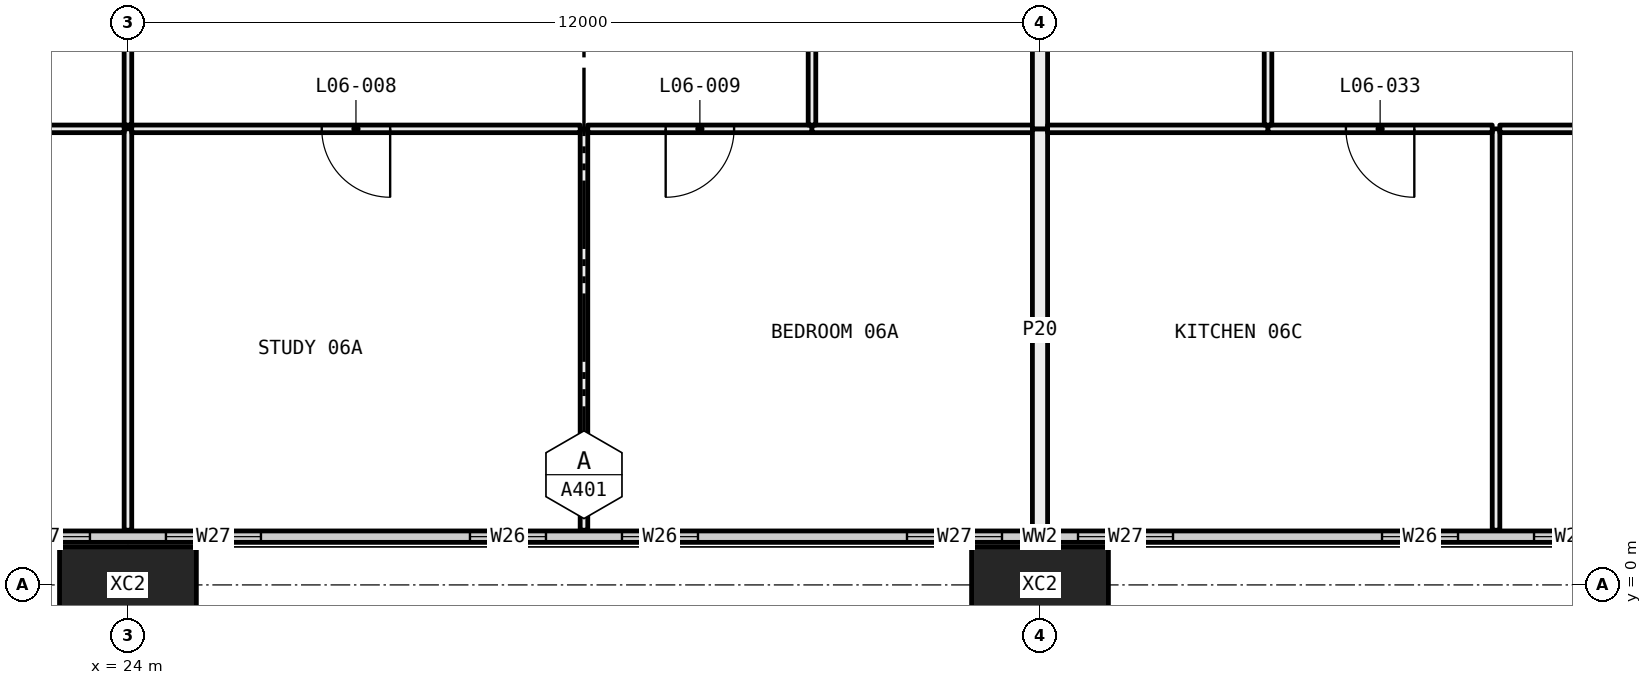
"""IFC4 building model, lengths in metres.
Left out: names, types, materials, properties, quantities, classifications, styles, units other than length and angle.
Written with IfcOpenShell. Run it as: python <this file> out.ifc"""

import sys

from ifc_helpers import new_model, si_unit, direction, frame, frame_2d, origin, origin_2d, place, context, subcontext, project, spatial, rectangle, hollow_rectangle, extrude, element, fill, save


model = new_model("IFC4")
c1 = context("Model", 3, precision=1e-05, world=origin(), true_north=direction((0.0, 1.0)))
c2 = subcontext(c1, "Body", "Model", "MODEL_VIEW")
j1 = project(units=[si_unit("LENGTHUNIT", "METRE"), si_unit("PLANEANGLEUNIT", "RADIAN")], contexts=[c1])
p1 = place(None, origin())
s1 = spatial("IfcSite", under=j1, at=p1, CompositionType="ELEMENT")
p2 = place(p1, origin())
s2 = spatial("IfcBuilding", under=s1, at=p2, CompositionType="ELEMENT")
p3 = place(p2, frame((0.0, 0.0, 33.45)))
s3 = spatial("IfcBuildingStorey", under=s2, at=p3, CompositionType="ELEMENT", Elevation=33.45)
for number, where, z_axis, x_axis in (
    (1, (24.0, 0.0, -0.4), (0.0, 0.0, 1.0), (1.0, 0.0, 0.0)),
    (2, (36.0, 0.0, -0.4), (0.0, 0.0, 1.0), (1.0, 0.0, 0.0)),
):
    element("IfcColumn", number, at=place(p3, frame(where, z_axis=z_axis, x_axis=x_axis)), inside=s3, PredefinedType="COLUMN", context=c2, shape_type="SweptSolid", body=[
        extrude(hollow_rectangle(XDim=1.8, YDim=1.0, WallThickness=0.07, at=origin_2d()), origin(), (0.0, 0.0, 1.0), 3.45),
    ])
p4 = place(p3, frame((6.56, 0.635, 0.0), z_axis=(0.0, 0.0, 1.0), x_axis=(1.0, 0.0, 0.0)))
e3 = element("IfcWall", 3, at=p4, inside=s3, PredefinedType="ELEMENTEDWALL", context=c2, shape_type="SweptSolid", body=[
    extrude(rectangle(XDim=58.88, YDim=0.15, at=frame_2d((29.44, 0.0))), origin(), (0.0, 0.0, 1.0), 3.05),
])
p5 = place(p4, frame((0.44, 0.0, 0.45)))
e4 = element("IfcOpeningElement", 4, at=p5, cuts=e3, PredefinedType="OPENING", context=c2, shape_type="SweptSolid", body=[
    extrude(rectangle(XDim=4.5, YDim=2.55, at=frame_2d((2.25, 1.275))), frame((0.0, 0.085, 0.0), z_axis=(0.0, -1.0, 0.0), x_axis=(1.0, 0.0, 0.0)), (0.0, 0.0, 1.0), 0.17),
])
p6 = place(p4, frame((5.94, 0.0, 0.45)))
e5 = element("IfcOpeningElement", 5, at=p6, cuts=e3, PredefinedType="OPENING", context=c2, shape_type="SweptSolid", body=[
    extrude(rectangle(XDim=1.25, YDim=2.55, at=frame_2d((0.625, 1.275))), frame((0.0, 0.085, 0.0), z_axis=(0.0, -1.0, 0.0), x_axis=(1.0, 0.0, 0.0)), (0.0, 0.0, 1.0), 0.17),
])
p7 = place(p4, frame((9.94, 0.0, 0.45)))
e6 = element("IfcOpeningElement", 6, at=p7, cuts=e3, PredefinedType="OPENING", context=c2, shape_type="SweptSolid", body=[
    extrude(rectangle(XDim=1.0, YDim=2.55, at=frame_2d((0.5, 1.275))), frame((0.0, 0.085, 0.0), z_axis=(0.0, -1.0, 0.0), x_axis=(1.0, 0.0, 0.0)), (0.0, 0.0, 1.0), 0.17),
])
p8 = place(p4, frame((11.94, 0.0, 0.45)))
e7 = element("IfcOpeningElement", 7, at=p8, cuts=e3, PredefinedType="OPENING", context=c2, shape_type="SweptSolid", body=[
    extrude(rectangle(XDim=1.0, YDim=2.55, at=frame_2d((0.5, 1.275))), frame((0.0, 0.085, 0.0), z_axis=(0.0, -1.0, 0.0), x_axis=(1.0, 0.0, 0.0)), (0.0, 0.0, 1.0), 0.17),
])
p9 = place(p4, frame((15.69, 0.0, 0.45)))
e8 = element("IfcOpeningElement", 8, at=p9, cuts=e3, PredefinedType="OPENING", context=c2, shape_type="SweptSolid", body=[
    extrude(rectangle(XDim=1.25, YDim=2.55, at=frame_2d((0.625, 1.275))), frame((0.0, 0.085, 0.0), z_axis=(0.0, -1.0, 0.0), x_axis=(1.0, 0.0, 0.0)), (0.0, 0.0, 1.0), 0.17),
])
p10 = place(p4, frame((17.94, 0.0, 0.45)))
e9 = element("IfcOpeningElement", 9, at=p10, cuts=e3, PredefinedType="OPENING", context=c2, shape_type="SweptSolid", body=[
    extrude(rectangle(XDim=1.25, YDim=2.55, at=frame_2d((0.625, 1.275))), frame((0.0, 0.085, 0.0), z_axis=(0.0, -1.0, 0.0), x_axis=(1.0, 0.0, 0.0)), (0.0, 0.0, 1.0), 0.17),
])
p11 = place(p4, frame((21.94, 0.0, 0.45)))
e10 = element("IfcOpeningElement", 10, at=p11, cuts=e3, PredefinedType="OPENING", context=c2, shape_type="SweptSolid", body=[
    extrude(rectangle(XDim=1.0, YDim=2.55, at=frame_2d((0.5, 1.275))), frame((0.0, 0.085, 0.0), z_axis=(0.0, -1.0, 0.0), x_axis=(1.0, 0.0, 0.0)), (0.0, 0.0, 1.0), 0.17),
])
p12 = place(p4, frame((23.94, 0.0, 0.45)))
e11 = element("IfcOpeningElement", 11, at=p12, cuts=e3, PredefinedType="OPENING", context=c2, shape_type="SweptSolid", body=[
    extrude(rectangle(XDim=1.0, YDim=2.55, at=frame_2d((0.5, 1.275))), frame((0.0, 0.085, 0.0), z_axis=(0.0, -1.0, 0.0), x_axis=(1.0, 0.0, 0.0)), (0.0, 0.0, 1.0), 0.17),
])
p13 = place(p4, frame((27.69, 0.0, 0.45)))
e12 = element("IfcOpeningElement", 12, at=p13, cuts=e3, PredefinedType="OPENING", context=c2, shape_type="SweptSolid", body=[
    extrude(rectangle(XDim=1.25, YDim=2.55, at=frame_2d((0.625, 1.275))), frame((0.0, 0.085, 0.0), z_axis=(0.0, -1.0, 0.0), x_axis=(1.0, 0.0, 0.0)), (0.0, 0.0, 1.0), 0.17),
])
p14 = place(p4, frame((29.94, 0.0, 0.45)))
e13 = element("IfcOpeningElement", 13, at=p14, cuts=e3, PredefinedType="OPENING", context=c2, shape_type="SweptSolid", body=[
    extrude(rectangle(XDim=1.25, YDim=2.55, at=frame_2d((0.625, 1.275))), frame((0.0, 0.085, 0.0), z_axis=(0.0, -1.0, 0.0), x_axis=(1.0, 0.0, 0.0)), (0.0, 0.0, 1.0), 0.17),
])
p15 = place(p4, frame((33.94, 0.0, 0.45)))
e14 = element("IfcOpeningElement", 14, at=p15, cuts=e3, PredefinedType="OPENING", context=c2, shape_type="SweptSolid", body=[
    extrude(rectangle(XDim=1.0, YDim=2.55, at=frame_2d((0.5, 1.275))), frame((0.0, 0.085, 0.0), z_axis=(0.0, -1.0, 0.0), x_axis=(1.0, 0.0, 0.0)), (0.0, 0.0, 1.0), 0.17),
])
p16 = place(p4, frame((35.94, 0.0, 0.45)))
e15 = element("IfcOpeningElement", 15, at=p16, cuts=e3, PredefinedType="OPENING", context=c2, shape_type="SweptSolid", body=[
    extrude(rectangle(XDim=1.0, YDim=2.55, at=frame_2d((0.5, 1.275))), frame((0.0, 0.085, 0.0), z_axis=(0.0, -1.0, 0.0), x_axis=(1.0, 0.0, 0.0)), (0.0, 0.0, 1.0), 0.17),
])
p17 = place(p4, frame((39.69, 0.0, 0.45)))
e16 = element("IfcOpeningElement", 16, at=p17, cuts=e3, PredefinedType="OPENING", context=c2, shape_type="SweptSolid", body=[
    extrude(rectangle(XDim=1.25, YDim=2.55, at=frame_2d((0.625, 1.275))), frame((0.0, 0.085, 0.0), z_axis=(0.0, -1.0, 0.0), x_axis=(1.0, 0.0, 0.0)), (0.0, 0.0, 1.0), 0.17),
])
p18 = place(p4, frame((41.94, 0.0, 0.45)))
e17 = element("IfcOpeningElement", 17, at=p18, cuts=e3, PredefinedType="OPENING", context=c2, shape_type="SweptSolid", body=[
    extrude(rectangle(XDim=1.25, YDim=2.55, at=frame_2d((0.625, 1.275))), frame((0.0, 0.085, 0.0), z_axis=(0.0, -1.0, 0.0), x_axis=(1.0, 0.0, 0.0)), (0.0, 0.0, 1.0), 0.17),
])
p19 = place(p4, frame((45.94, 0.0, 0.45)))
e18 = element("IfcOpeningElement", 18, at=p19, cuts=e3, PredefinedType="OPENING", context=c2, shape_type="SweptSolid", body=[
    extrude(rectangle(XDim=1.0, YDim=2.55, at=frame_2d((0.5, 1.275))), frame((0.0, 0.085, 0.0), z_axis=(0.0, -1.0, 0.0), x_axis=(1.0, 0.0, 0.0)), (0.0, 0.0, 1.0), 0.17),
])
p20 = place(p4, frame((47.94, 0.0, 0.45)))
e19 = element("IfcOpeningElement", 19, at=p20, cuts=e3, PredefinedType="OPENING", context=c2, shape_type="SweptSolid", body=[
    extrude(rectangle(XDim=1.0, YDim=2.55, at=frame_2d((0.5, 1.275))), frame((0.0, 0.085, 0.0), z_axis=(0.0, -1.0, 0.0), x_axis=(1.0, 0.0, 0.0)), (0.0, 0.0, 1.0), 0.17),
])
p21 = place(p4, frame((51.69, 0.0, 0.45)))
e20 = element("IfcOpeningElement", 20, at=p21, cuts=e3, PredefinedType="OPENING", context=c2, shape_type="SweptSolid", body=[
    extrude(rectangle(XDim=1.25, YDim=2.55, at=frame_2d((0.625, 1.275))), frame((0.0, 0.085, 0.0), z_axis=(0.0, -1.0, 0.0), x_axis=(1.0, 0.0, 0.0)), (0.0, 0.0, 1.0), 0.17),
])
p22 = place(p4, frame((53.94, 0.0, 0.45)))
e21 = element("IfcOpeningElement", 21, at=p22, cuts=e3, PredefinedType="OPENING", context=c2, shape_type="SweptSolid", body=[
    extrude(rectangle(XDim=4.5, YDim=2.55, at=frame_2d((2.25, 1.275))), frame((0.0, 0.085, 0.0), z_axis=(0.0, -1.0, 0.0), x_axis=(1.0, 0.0, 0.0)), (0.0, 0.0, 1.0), 0.17),
])
p23 = place(p3, frame((24.0, 0.72, 0.0), z_axis=(0.0, 0.0, 1.0), x_axis=(0.0, 1.0, 0.0)))
e22 = element("IfcWall", 22, at=p23, inside=s3, PredefinedType="PARTITIONING", context=c2, shape_type="SweptSolid", body=[
    extrude(rectangle(XDim=5.28, YDim=0.1, at=frame_2d((2.64, 0.0))), origin(), (0.0, 0.0, 1.0), 2.45),
])
p24 = place(p3, frame((23.95, 6.0, 0.0), z_axis=(0.0, 0.0, 1.0), x_axis=(-1.0, 0.0, 0.0)))
e23 = element("IfcWall", 23, at=p24, inside=s3, PredefinedType="PARTITIONING", context=c2, shape_type="SweptSolid", body=[
    extrude(rectangle(XDim=5.9, YDim=0.1, at=frame_2d((2.95, 0.0))), origin(), (0.0, 0.0, 1.0), 2.45),
])
p25 = place(p24, frame((2.5, 0.0, 0.0)))
e24 = element("IfcOpeningElement", 24, at=p25, cuts=e23, PredefinedType="OPENING", context=c2, shape_type="SweptSolid", body=[
    extrude(rectangle(XDim=0.9, YDim=2.1, at=frame_2d((0.45, 1.05))), frame((0.0, 0.06, 0.0), z_axis=(0.0, -1.0, 0.0), x_axis=(1.0, 0.0, 0.0)), (0.0, 0.0, 1.0), 0.12),
])
p26 = place(p3, frame((30.0, 0.72, 0.0), z_axis=(0.0, 0.0, 1.0), x_axis=(0.0, 1.0, 0.0)))
e25 = element("IfcWall", 25, at=p26, inside=s3, PredefinedType="PARTITIONING", context=c2, shape_type="SweptSolid", body=[
    extrude(rectangle(XDim=5.28, YDim=0.1, at=frame_2d((2.64, 0.0))), origin(), (0.0, 0.0, 1.0), 3.05),
])
p27 = place(p3, frame((29.95, 6.0, 0.0), z_axis=(0.0, 0.0, 1.0), x_axis=(-1.0, 0.0, 0.0)))
e26 = element("IfcWall", 26, at=p27, inside=s3, PredefinedType="PARTITIONING", context=c2, shape_type="SweptSolid", body=[
    extrude(rectangle(XDim=5.9, YDim=0.1, at=frame_2d((2.95, 0.0))), origin(), (0.0, 0.0, 1.0), 2.45),
])
p28 = place(p27, frame((2.5, 0.0, 0.0)))
e27 = element("IfcOpeningElement", 27, at=p28, cuts=e26, PredefinedType="OPENING", context=c2, shape_type="SweptSolid", body=[
    extrude(rectangle(XDim=0.9, YDim=2.1, at=frame_2d((0.45, 1.05))), frame((0.0, 0.06, 0.0), z_axis=(0.0, -1.0, 0.0), x_axis=(1.0, 0.0, 0.0)), (0.0, 0.0, 1.0), 0.12),
])
p29 = place(p3, frame((33.0, 6.0, 0.0), z_axis=(0.0, 0.0, 1.0), x_axis=(-1.0, 0.0, 0.0)))
e28 = element("IfcWall", 28, at=p29, inside=s3, PredefinedType="PARTITIONING", context=c2, shape_type="SweptSolid", body=[
    extrude(rectangle(XDim=2.95, YDim=0.1, at=frame_2d((1.475, 0.0))), origin(), (0.0, 0.0, 1.0), 3.05),
])
p30 = place(p29, frame((1.025, 0.0, 0.0)))
e29 = element("IfcOpeningElement", 29, at=p30, cuts=e28, PredefinedType="OPENING", context=c2, shape_type="SweptSolid", body=[
    extrude(rectangle(XDim=0.9, YDim=2.1, at=frame_2d((0.45, 1.05))), frame((0.0, 0.06, 0.0), z_axis=(0.0, -1.0, 0.0), x_axis=(1.0, 0.0, 0.0)), (0.0, 0.0, 1.0), 0.12),
])
p31 = place(p3, frame((35.9, 6.0, 0.0), z_axis=(0.0, 0.0, 1.0), x_axis=(-1.0, 0.0, 0.0)))
e30 = element("IfcWall", 30, at=p31, inside=s3, PredefinedType="PARTITIONING", context=c2, shape_type="SweptSolid", body=[
    extrude(rectangle(XDim=2.9, YDim=0.1, at=frame_2d((1.45, 0.0))), origin(), (0.0, 0.0, 1.0), 3.05),
])
p32 = place(p3, frame((36.0, 0.72, 0.0), z_axis=(0.0, 0.0, 1.0), x_axis=(0.0, 1.0, 0.0)))
e31 = element("IfcWall", 31, at=p32, inside=s3, PredefinedType="PARTITIONING", context=c2, shape_type="SweptSolid", body=[
    extrude(rectangle(XDim=5.28, YDim=0.2, at=frame_2d((2.64, 0.0))), origin(), (0.0, 0.0, 1.0), 2.45),
])
p33 = place(p3, frame((24.0, 6.05, 0.0), z_axis=(0.0, 0.0, 1.0), x_axis=(0.0, 1.0, 0.0)))
e32 = element("IfcWall", 32, at=p33, inside=s3, PredefinedType="PARTITIONING", context=c2, shape_type="SweptSolid", body=[
    extrude(rectangle(XDim=5.15, YDim=0.1, at=frame_2d((2.575, 0.0))), origin(), (0.0, 0.0, 1.0), 2.45),
])
p34 = place(p33, frame((2.125, 0.0, 0.0)))
e33 = element("IfcOpeningElement", 33, at=p34, cuts=e32, PredefinedType="OPENING", context=c2, shape_type="SweptSolid", body=[
    extrude(rectangle(XDim=0.9, YDim=2.1, at=frame_2d((0.45, 1.05))), frame((0.0, 0.06, 0.0), z_axis=(0.0, -1.0, 0.0), x_axis=(1.0, 0.0, 0.0)), (0.0, 0.0, 1.0), 0.12),
])
p35 = place(p3, frame((33.0, 6.05, 0.0), z_axis=(0.0, 0.0, 1.0), x_axis=(0.0, 1.0, 0.0)))
e34 = element("IfcWall", 34, at=p35, inside=s3, PredefinedType="PARTITIONING", context=c2, shape_type="SweptSolid", body=[
    extrude(rectangle(XDim=5.95, YDim=0.1, at=frame_2d((2.975, 0.0))), origin(), (0.0, 0.0, 1.0), 2.45),
])
p36 = place(p35, frame((2.525, 0.0, 0.0)))
e35 = element("IfcOpeningElement", 35, at=p36, cuts=e34, PredefinedType="OPENING", context=c2, shape_type="SweptSolid", body=[
    extrude(rectangle(XDim=0.9, YDim=2.1, at=frame_2d((0.45, 1.05))), frame((0.0, 0.06, 0.0), z_axis=(0.0, -1.0, 0.0), x_axis=(1.0, 0.0, 0.0)), (0.0, 0.0, 1.0), 0.12),
])
p37 = place(p3, frame((36.0, 6.0, 0.0), z_axis=(0.0, 0.0, 1.0), x_axis=(0.0, 1.0, 0.0)))
e36 = element("IfcWall", 36, at=p37, inside=s3, PredefinedType="PARTITIONING", context=c2, shape_type="SweptSolid", body=[
    extrude(rectangle(XDim=5.2, YDim=0.2, at=frame_2d((2.6, 0.0))), origin(), (0.0, 0.0, 1.0), 2.45),
])
p38 = place(p3, frame((42.0, 0.72, 0.0), z_axis=(0.0, 0.0, 1.0), x_axis=(0.0, 1.0, 0.0)))
e37 = element("IfcWall", 37, at=p38, inside=s3, PredefinedType="PARTITIONING", context=c2, shape_type="SweptSolid", body=[
    extrude(rectangle(XDim=5.28, YDim=0.1, at=frame_2d((2.64, 0.0))), origin(), (0.0, 0.0, 1.0), 3.05),
])
p39 = place(p3, frame((39.0, 6.0, 0.0), z_axis=(0.0, 0.0, 1.0), x_axis=(-1.0, 0.0, 0.0)))
e38 = element("IfcWall", 38, at=p39, inside=s3, PredefinedType="PARTITIONING", context=c2, shape_type="SweptSolid", body=[
    extrude(rectangle(XDim=2.9, YDim=0.1, at=frame_2d((1.45, 0.0))), origin(), (0.0, 0.0, 1.0), 3.05),
])
p40 = place(p3, frame((41.95, 6.0, 0.0), z_axis=(0.0, 0.0, 1.0), x_axis=(-1.0, 0.0, 0.0)))
e39 = element("IfcWall", 39, at=p40, inside=s3, PredefinedType="PARTITIONING", context=c2, shape_type="SweptSolid", body=[
    extrude(rectangle(XDim=2.95, YDim=0.1, at=frame_2d((1.475, 0.0))), origin(), (0.0, 0.0, 1.0), 3.05),
])
p41 = place(p40, frame((1.025, 0.0, 0.0)))
e40 = element("IfcOpeningElement", 40, at=p41, cuts=e39, PredefinedType="OPENING", context=c2, shape_type="SweptSolid", body=[
    extrude(rectangle(XDim=0.9, YDim=2.1, at=frame_2d((0.45, 1.05))), frame((0.0, 0.06, 0.0), z_axis=(0.0, -1.0, 0.0), x_axis=(1.0, 0.0, 0.0)), (0.0, 0.0, 1.0), 0.12),
])
p42 = place(p3, frame((47.07, 6.0, 0.0), z_axis=(0.0, 0.0, 1.0), x_axis=(-1.0, 0.0, 0.0)))
e41 = element("IfcWall", 41, at=p42, inside=s3, PredefinedType="PARTITIONING", context=c2, shape_type="SweptSolid", body=[
    extrude(rectangle(XDim=5.02, YDim=0.1, at=frame_2d((2.51, 0.0))), origin(), (0.0, 0.0, 1.0), 3.05),
])
p43 = place(p3, frame((39.0, 6.05, 0.0), z_axis=(0.0, 0.0, 1.0), x_axis=(0.0, 1.0, 0.0)))
e42 = element("IfcWall", 42, at=p43, inside=s3, PredefinedType="PARTITIONING", context=c2, shape_type="SweptSolid", body=[
    extrude(rectangle(XDim=5.95, YDim=0.1, at=frame_2d((2.975, 0.0))), origin(), (0.0, 0.0, 1.0), 2.45),
])
p44 = place(p43, frame((2.525, 0.0, 0.0)))
e43 = element("IfcOpeningElement", 43, at=p44, cuts=e42, PredefinedType="OPENING", context=c2, shape_type="SweptSolid", body=[
    extrude(rectangle(XDim=0.9, YDim=2.1, at=frame_2d((0.45, 1.05))), frame((0.0, 0.06, 0.0), z_axis=(0.0, -1.0, 0.0), x_axis=(1.0, 0.0, 0.0)), (0.0, 0.0, 1.0), 0.12),
])
p45 = place(p9, origin())
e44 = element("IfcWindow", 44, at=p45, inside=s3, PartitioningType="SINGLE_PANEL", PredefinedType="WINDOW", context=c2, shape_type="SweptSolid", body=[
    extrude(rectangle(XDim=1.25, YDim=2.55, at=frame_2d((0.625, 1.275))), frame((0.0, 0.03, 0.0), z_axis=(0.0, -1.0, 0.0), x_axis=(1.0, 0.0, 0.0)), (0.0, 0.0, 1.0), 0.06),
])
fill(e8, e44)
p46 = place(p10, origin())
e45 = element("IfcWindow", 45, at=p46, inside=s3, PartitioningType="SINGLE_PANEL", PredefinedType="WINDOW", context=c2, shape_type="SweptSolid", body=[
    extrude(rectangle(XDim=1.25, YDim=2.55, at=frame_2d((0.625, 1.275))), frame((0.0, 0.03, 0.0), z_axis=(0.0, -1.0, 0.0), x_axis=(1.0, 0.0, 0.0)), (0.0, 0.0, 1.0), 0.06),
])
fill(e9, e45)
p47 = place(p11, origin())
e46 = element("IfcWindow", 46, at=p47, inside=s3, PartitioningType="SINGLE_PANEL", PredefinedType="WINDOW", context=c2, shape_type="SweptSolid", body=[
    extrude(rectangle(XDim=1.0, YDim=2.55, at=frame_2d((0.5, 1.275))), frame((0.0, 0.03, 0.0), z_axis=(0.0, -1.0, 0.0), x_axis=(1.0, 0.0, 0.0)), (0.0, 0.0, 1.0), 0.06),
])
fill(e10, e46)
p48 = place(p12, origin())
e47 = element("IfcWindow", 47, at=p48, inside=s3, PartitioningType="SINGLE_PANEL", PredefinedType="WINDOW", context=c2, shape_type="SweptSolid", body=[
    extrude(rectangle(XDim=1.0, YDim=2.55, at=frame_2d((0.5, 1.275))), frame((0.0, 0.03, 0.0), z_axis=(0.0, -1.0, 0.0), x_axis=(1.0, 0.0, 0.0)), (0.0, 0.0, 1.0), 0.06),
])
fill(e11, e47)
p49 = place(p13, origin())
e48 = element("IfcWindow", 48, at=p49, inside=s3, PartitioningType="SINGLE_PANEL", PredefinedType="WINDOW", context=c2, shape_type="SweptSolid", body=[
    extrude(rectangle(XDim=1.25, YDim=2.55, at=frame_2d((0.625, 1.275))), frame((0.0, 0.03, 0.0), z_axis=(0.0, -1.0, 0.0), x_axis=(1.0, 0.0, 0.0)), (0.0, 0.0, 1.0), 0.06),
])
fill(e12, e48)
p50 = place(p14, origin())
e49 = element("IfcWindow", 49, at=p50, inside=s3, PartitioningType="SINGLE_PANEL", PredefinedType="WINDOW", context=c2, shape_type="SweptSolid", body=[
    extrude(rectangle(XDim=1.25, YDim=2.55, at=frame_2d((0.625, 1.275))), frame((0.0, 0.03, 0.0), z_axis=(0.0, -1.0, 0.0), x_axis=(1.0, 0.0, 0.0)), (0.0, 0.0, 1.0), 0.06),
])
fill(e13, e49)
p51 = place(p15, origin())
e50 = element("IfcWindow", 50, at=p51, inside=s3, PartitioningType="SINGLE_PANEL", PredefinedType="WINDOW", context=c2, shape_type="SweptSolid", body=[
    extrude(rectangle(XDim=1.0, YDim=2.55, at=frame_2d((0.5, 1.275))), frame((0.0, 0.03, 0.0), z_axis=(0.0, -1.0, 0.0), x_axis=(1.0, 0.0, 0.0)), (0.0, 0.0, 1.0), 0.06),
])
fill(e14, e50)
p52 = place(p16, origin())
e51 = element("IfcWindow", 51, at=p52, inside=s3, PartitioningType="SINGLE_PANEL", PredefinedType="WINDOW", context=c2, shape_type="SweptSolid", body=[
    extrude(rectangle(XDim=1.0, YDim=2.55, at=frame_2d((0.5, 1.275))), frame((0.0, 0.03, 0.0), z_axis=(0.0, -1.0, 0.0), x_axis=(1.0, 0.0, 0.0)), (0.0, 0.0, 1.0), 0.06),
])
fill(e15, e51)
p53 = place(p28, origin())
e52 = element("IfcDoor", 52, at=p53, inside=s3, OperationType="SINGLE_SWING_RIGHT", PredefinedType="DOOR", context=c2, shape_type="SweptSolid", body=[
    extrude(rectangle(XDim=0.9, YDim=2.1, at=frame_2d((0.45, 1.05))), frame((0.0, 0.025, 0.0), z_axis=(0.0, -1.0, 0.0), x_axis=(1.0, 0.0, 0.0)), (0.0, 0.0, 1.0), 0.05),
])
fill(e27, e52)
p54 = place(p30, origin())
e53 = element("IfcDoor", 53, at=p54, inside=s3, OperationType="SINGLE_SWING_LEFT", PredefinedType="DOOR", context=c2, shape_type="SweptSolid", body=[
    extrude(rectangle(XDim=0.9, YDim=2.1, at=frame_2d((0.45, 1.05))), frame((0.0, 0.025, 0.0), z_axis=(0.0, -1.0, 0.0), x_axis=(1.0, 0.0, 0.0)), (0.0, 0.0, 1.0), 0.05),
])
fill(e29, e53)
p55 = place(p41, origin())
e54 = element("IfcDoor", 54, at=p55, inside=s3, OperationType="SINGLE_SWING_RIGHT", PredefinedType="DOOR", context=c2, shape_type="SweptSolid", body=[
    extrude(rectangle(XDim=0.9, YDim=2.1, at=frame_2d((0.45, 1.05))), frame((0.0, 0.025, 0.0), z_axis=(0.0, -1.0, 0.0), x_axis=(1.0, 0.0, 0.0)), (0.0, 0.0, 1.0), 0.05),
])
fill(e40, e54)
save(model, sys.argv[1])
